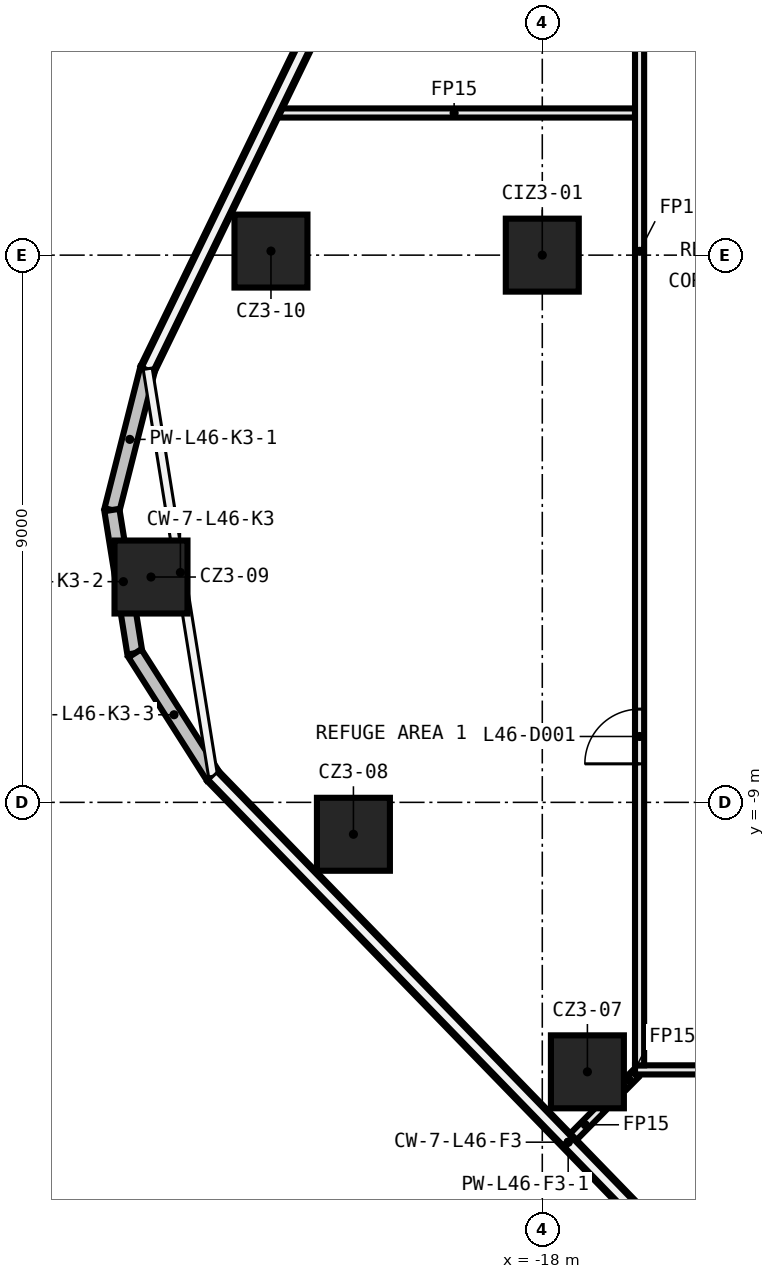
"""IFC4 building model, lengths in metres.
Left out: names, types, materials, properties, quantities, classifications, styles, units other than length and angle.
Written with IfcOpenShell. Run it as: python <this file> out.ifc"""

import sys

from ifc_helpers import new_model, si_unit, direction, frame, frame_2d, origin, origin_2d, place, context, subcontext, project, spatial, rectangle, extrude, element, fill, save


model = new_model("IFC4")
c1 = context("Model", 3, precision=1e-05, world=origin(), true_north=direction((0.0, 1.0)))
c2 = subcontext(c1, "Body", "Model", "MODEL_VIEW")
j1 = project(units=[si_unit("LENGTHUNIT", "METRE"), si_unit("PLANEANGLEUNIT", "RADIAN")], contexts=[c1])
p1 = place(None, origin())
s1 = spatial("IfcSite", under=j1, at=p1, CompositionType="ELEMENT")
p2 = place(p1, origin())
s2 = spatial("IfcBuilding", under=s1, at=p2, CompositionType="ELEMENT")
p3 = place(p2, frame((0.0, 0.0, 220.6)))
s3 = spatial("IfcBuildingStorey", under=s2, at=p3, CompositionType="ELEMENT", Elevation=220.6)
for number, where, z_axis, x_axis in (
    (1, (-17.258, -13.432, 0.0), (0.0, 0.0, 1.0), (1.0, 0.0, 0.0)),
    (2, (-21.106, -9.525, 0.0), (0.0, 0.0, 1.0), (1.0, 0.0, 0.0)),
    (3, (-24.435, -5.294, 0.0), (0.0, 0.0, 1.0), (1.0, 0.0, 0.0)),
    (4, (-22.462, 0.067, 0.0), (0.0, 0.0, 1.0), (1.0, 0.0, 0.0)),
    (5, (-18.0, 0.0, 0.0), (0.0, 0.0, 1.0), (1.0, 0.0, 0.0)),
):
    element("IfcColumn", number, at=place(p3, frame(where, z_axis=z_axis, x_axis=x_axis)), inside=s3, PredefinedType="COLUMN", context=c2, shape_type="SweptSolid", body=[
        extrude(rectangle(XDim=1.2, YDim=1.2, at=origin_2d()), origin(), (0.0, 0.0, 1.0), 7.55),
    ])
p4 = place(p3, frame((16.475, -13.4, 0.0), z_axis=(0.0, 0.0, 1.0), x_axis=(-1.0, 0.0, 0.0)))
e6 = element("IfcWall", 6, at=p4, inside=s3, PredefinedType="PARTITIONING", context=c2, shape_type="SweptSolid", body=[
    extrude(rectangle(XDim=32.95, YDim=0.15, at=frame_2d((16.475, 0.0))), origin(), (0.0, 0.0, 1.0), 7.55),
])
p5 = place(p4, frame((28.298, 0.0, 0.0)))
e7 = element("IfcOpeningElement", 7, at=p5, cuts=e6, PredefinedType="OPENING", context=c2, shape_type="SweptSolid", body=[
    extrude(rectangle(XDim=0.9, YDim=2.1, at=frame_2d((0.45, 1.05))), frame((0.0, 0.085, 0.0), z_axis=(0.0, -1.0, 0.0), x_axis=(1.0, 0.0, 0.0)), (0.0, 0.0, 1.0), 0.17),
])
p6 = place(p4, frame((20.59, 0.0, 0.0)))
e8 = element("IfcOpeningElement", 8, at=p6, cuts=e6, PredefinedType="OPENING", context=c2, shape_type="SweptSolid", body=[
    extrude(rectangle(XDim=0.9, YDim=2.1, at=frame_2d((0.45, 1.05))), frame((0.0, 0.085, 0.0), z_axis=(0.0, -1.0, 0.0), x_axis=(1.0, 0.0, 0.0)), (0.0, 0.0, 1.0), 0.17),
])
p7 = place(p4, frame((12.541, 0.0, 0.0)))
e9 = element("IfcOpeningElement", 9, at=p7, cuts=e6, PredefinedType="OPENING", context=c2, shape_type="SweptSolid", body=[
    extrude(rectangle(XDim=0.9, YDim=2.1, at=frame_2d((0.45, 1.05))), frame((0.0, 0.085, 0.0), z_axis=(0.0, -1.0, 0.0), x_axis=(1.0, 0.0, 0.0)), (0.0, 0.0, 1.0), 0.17),
])
p8 = place(p3, frame((-22.425, 2.338, 0.0), z_axis=(0.0, 0.0, 1.0), x_axis=(1.0, 0.0, 0.0)))
e10 = element("IfcWall", 10, at=p8, inside=s3, PredefinedType="PARTITIONING", context=c2, shape_type="SweptSolid", body=[
    extrude(rectangle(XDim=5.949, YDim=0.15, at=frame_2d((2.975, 0.0))), origin(), (0.0, 0.0, 1.0), 7.55),
])
p9 = place(p3, frame((-17.562, -14.573, 0.0), z_axis=(0.0, 0.0, 1.0), x_axis=(0.703572116598, 0.710623864464, 0.0)))
e11 = element("IfcWall", 11, at=p9, inside=s3, PredefinedType="PARTITIONING", context=c2, shape_type="SweptSolid", body=[
    extrude(rectangle(XDim=0.762, YDim=0.15, at=frame_2d((0.381, 0.0))), origin(), (0.0, 0.0, 1.0), 7.55),
])
p10 = place(p3, frame((-16.658, -13.661, 0.0), z_axis=(0.0, 0.0, 1.0), x_axis=(0.703320480556, 0.710872915246, 0.0)))
e12 = element("IfcWall", 12, at=p10, inside=s3, PredefinedType="PARTITIONING", context=c2, shape_type="SweptSolid", body=[
    extrude(rectangle(XDim=0.259, YDim=0.15, at=frame_2d((0.129, 0.0))), origin(), (0.0, 0.0, 1.0), 7.55),
])
p11 = place(p3, frame((-16.4, -13.325, 0.0), z_axis=(0.0, 0.0, 1.0), x_axis=(0.0, 1.0, 0.0)))
e13 = element("IfcWall", 13, at=p11, inside=s3, PredefinedType="PARTITIONING", context=c2, shape_type="SweptSolid", body=[
    extrude(rectangle(XDim=26.65, YDim=0.15, at=frame_2d((13.325, 0.0))), origin(), (0.0, 0.0, 1.0), 7.55),
])
p12 = place(p11, frame((4.958, 0.0, 0.0)))
e14 = element("IfcOpeningElement", 14, at=p12, cuts=e13, PredefinedType="OPENING", context=c2, shape_type="SweptSolid", body=[
    extrude(rectangle(XDim=0.9, YDim=2.1, at=frame_2d((0.45, 1.05))), frame((0.0, 0.085, 0.0), z_axis=(0.0, -1.0, 0.0), x_axis=(1.0, 0.0, 0.0)), (0.0, 0.0, 1.0), 0.17),
])
p13 = place(p11, frame((20.917, 0.0, 0.0)))
e15 = element("IfcOpeningElement", 15, at=p13, cuts=e13, PredefinedType="OPENING", context=c2, shape_type="SweptSolid", body=[
    extrude(rectangle(XDim=0.9, YDim=2.1, at=frame_2d((0.45, 1.05))), frame((0.0, 0.085, 0.0), z_axis=(0.0, -1.0, 0.0), x_axis=(1.0, 0.0, 0.0)), (0.0, 0.0, 1.0), 0.17),
])
p14 = place(p3, frame((-14.369, 18.976, 0.0), z_axis=(0.0, 0.0, 1.0), x_axis=(-0.436764875806, -0.899575701796, 0.0)))
e16 = element("IfcWall", 16, at=p14, inside=s3, PredefinedType="SOLIDWALL", context=c2, shape_type="SweptSolid", body=[
    extrude(rectangle(XDim=23.171, YDim=0.25, at=frame_2d((11.585, 0.0))), origin(), (0.0, 0.0, 1.0), 7.55),
])
p15 = place(p3, frame((-24.489, -1.869, 0.0), z_axis=(0.0, 0.0, 1.0), x_axis=(-0.245793851247, -0.969322125348, 0.0)))
e17 = element("IfcWall", 17, at=p15, inside=s3, PredefinedType="SOLIDWALL", context=c2, shape_type="SweptSolid", body=[
    extrude(rectangle(XDim=2.397, YDim=0.25, at=frame_2d((1.198, 0.0))), origin(), (0.0, 0.0, 1.0), 7.55),
])
p16 = place(p3, frame((-25.078, -4.192, 0.0), z_axis=(0.0, 0.0, 1.0), x_axis=(0.158473287488, -0.987363265041, 0.0)))
e18 = element("IfcWall", 18, at=p16, inside=s3, PredefinedType="SOLIDWALL", context=c2, shape_type="SweptSolid", body=[
    extrude(rectangle(XDim=2.386, YDim=0.25, at=frame_2d((1.193, 0.0))), origin(), (0.0, 0.0, 1.0), 7.55),
])
p17 = place(p3, frame((-24.7, -6.548, 0.0), z_axis=(0.0, 0.0, 1.0), x_axis=(0.536756859965, -0.843736969251, 0.0)))
e19 = element("IfcWall", 19, at=p17, inside=s3, PredefinedType="SOLIDWALL", context=c2, shape_type="SweptSolid", body=[
    extrude(rectangle(XDim=2.397, YDim=0.25, at=frame_2d((1.198, 0.0))), origin(), (0.0, 0.0, 1.0), 7.55),
])
p18 = place(p3, frame((-23.414, -8.571, 0.0), z_axis=(0.0, 0.0, 1.0), x_axis=(0.696348823558, -0.717703501405, 0.0)))
e20 = element("IfcWall", 20, at=p18, inside=s3, PredefinedType="SOLIDWALL", context=c2, shape_type="SweptSolid", body=[
    extrude(rectangle(XDim=16.772, YDim=0.25, at=frame_2d((8.386, 0.0))), origin(), (0.0, 0.0, 1.0), 7.55),
])
p19 = place(p12, origin())
e21 = element("IfcDoor", 21, at=p19, inside=s3, OperationType="SINGLE_SWING_RIGHT", PredefinedType="DOOR", context=c2, shape_type="SweptSolid", body=[
    extrude(rectangle(XDim=0.9, YDim=2.1, at=frame_2d((0.45, 1.05))), frame((0.0, 0.025, 0.0), z_axis=(0.0, -1.0, 0.0), x_axis=(1.0, 0.0, 0.0)), (0.0, 0.0, 1.0), 0.05),
])
fill(e14, e21)
save(model, sys.argv[1])
